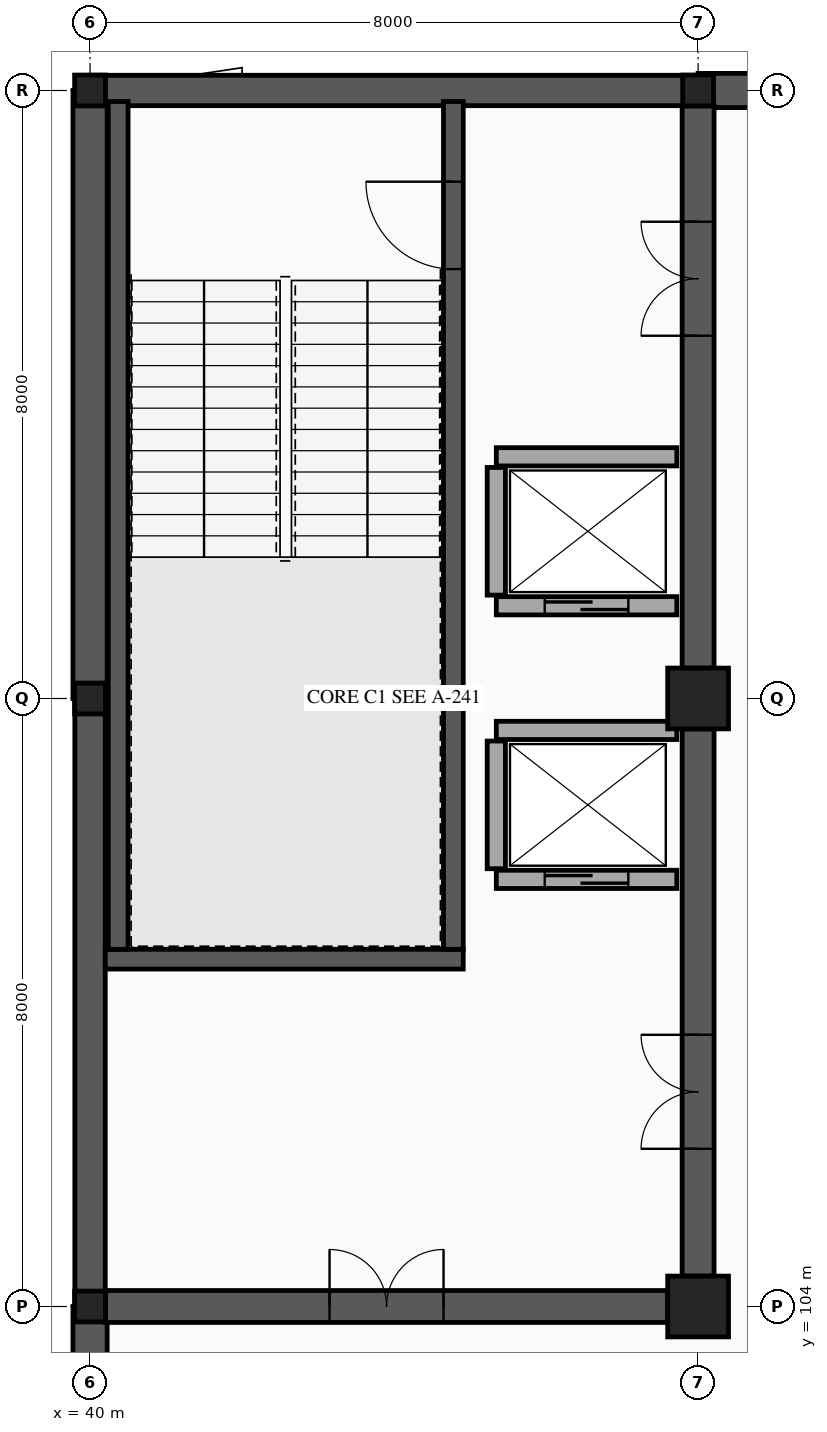
"""IFC4 building model, lengths in metres.
Left out: names, types, materials, properties, quantities, classifications, styles, units other than length and angle.
Written with IfcOpenShell. Run it as: python <this file> out.ifc"""

import sys

from ifc_helpers import new_model, si_unit, direction, frame, frame_2d, origin, origin_2d, place, context, subcontext, project, spatial, rectangle, hollow_rectangle, extrude, element, fill, save


model = new_model("IFC4")
c1 = context("Model", 3, precision=1e-05, world=origin(), true_north=direction((0.0, 1.0)))
c2 = subcontext(c1, "Body", "Model", "MODEL_VIEW")
j1 = project(units=[si_unit("LENGTHUNIT", "METRE"), si_unit("PLANEANGLEUNIT", "RADIAN")], contexts=[c1])
p1 = place(None, origin())
s1 = spatial("IfcSite", under=j1, at=p1, CompositionType="ELEMENT")
p2 = place(p1, origin())
s2 = spatial("IfcBuilding", under=s1, at=p2, CompositionType="ELEMENT")
p3 = place(p2, frame((0.0, 0.0, -4.8)))
s3 = spatial("IfcBuildingStorey", under=s2, at=p3, CompositionType="ELEMENT", Elevation=-4.8)
for number, where, z_axis, x_axis in (
    (1, (40.0, 104.0, 0.0), (0.0, 0.0, 1.0), (1.0, 0.0, 0.0)),
    (2, (40.0, 112.0, 0.0), (0.0, 0.0, 1.0), (1.0, 0.0, 0.0)),
    (3, (40.0, 120.0, 0.0), (0.0, 0.0, 1.0), (1.0, 0.0, 0.0)),
):
    element("IfcColumn", number, at=place(p3, frame(where, z_axis=z_axis, x_axis=x_axis)), inside=s3, PredefinedType="COLUMN", context=c2, shape_type="SweptSolid", body=[
        extrude(hollow_rectangle(XDim=0.406, YDim=0.406, WallThickness=0.015, InnerFilletRadius=0.015, OuterFilletRadius=0.029, at=origin_2d()), origin(), (0.0, 0.0, 1.0), 4.8),
    ])
for number, where, z_axis, x_axis in (
    (4, (48.0, 104.0, 0.0), (0.0, 0.0, 1.0), (1.0, 0.0, 0.0)),
    (5, (48.0, 112.0, 0.0), (0.0, 0.0, 1.0), (1.0, 0.0, 0.0)),
):
    element("IfcColumn", number, at=place(p3, frame(where, z_axis=z_axis, x_axis=x_axis)), inside=s3, PredefinedType="COLUMN", context=c2, shape_type="SweptSolid", body=[
        extrude(rectangle(XDim=0.8, YDim=0.8, at=origin_2d()), origin(), (0.0, 0.0, 1.0), 4.8),
    ])
p4 = place(p3, frame((48.0, 120.0, 0.0), z_axis=(0.0, 0.0, 1.0), x_axis=(1.0, 0.0, 0.0)))
e6 = element("IfcColumn", 6, at=p4, inside=s3, PredefinedType="COLUMN", context=c2, shape_type="SweptSolid", body=[
    extrude(hollow_rectangle(XDim=0.406, YDim=0.406, WallThickness=0.015, InnerFilletRadius=0.015, OuterFilletRadius=0.029, at=origin_2d()), origin(), (0.0, 0.0, 1.0), 4.8),
])
p5 = place(p3, frame((40.0, 96.0, 0.0), z_axis=(0.0, 0.0, 1.0), x_axis=(0.0, 1.0, 0.0)))
e7 = element("IfcWall", 7, at=p5, inside=s3, PredefinedType="USERDEFINED", context=c2, shape_type="SweptSolid", body=[
    extrude(rectangle(XDim=8.0, YDim=0.45, at=frame_2d((4.0, 0.0))), origin(), (0.0, 0.0, 1.0), 4.5),
])
p6 = place(p3, frame((40.0, 104.0, 0.0), z_axis=(0.0, 0.0, 1.0), x_axis=(0.0, 1.0, 0.0)))
e8 = element("IfcWall", 8, at=p6, inside=s3, PredefinedType="USERDEFINED", context=c2, shape_type="SweptSolid", body=[
    extrude(rectangle(XDim=8.0, YDim=0.4, at=frame_2d((4.0, 0.0))), origin(), (0.0, 0.0, 1.0), 4.5),
])
p7 = place(p3, frame((40.0, 112.0, 0.0), z_axis=(0.0, 0.0, 1.0), x_axis=(0.0, 1.0, 0.0)))
e9 = element("IfcWall", 9, at=p7, inside=s3, PredefinedType="USERDEFINED", context=c2, shape_type="SweptSolid", body=[
    extrude(rectangle(XDim=8.0, YDim=0.45, at=frame_2d((4.0, 0.0))), origin(), (0.0, 0.0, 1.0), 4.5),
])
p8 = place(p3, frame((40.0, 120.0, 0.0), z_axis=(0.0, 0.0, 1.0), x_axis=(1.0, 0.0, 0.0)))
e10 = element("IfcWall", 10, at=p8, inside=s3, PredefinedType="USERDEFINED", context=c2, shape_type="SweptSolid", body=[
    extrude(rectangle(XDim=8.0, YDim=0.4, at=frame_2d((4.0, 0.0))), origin(), (0.0, 0.0, 1.0), 4.5),
])
p9 = place(p3, frame((48.0, 120.0, 0.0), z_axis=(0.0, 0.0, 1.0), x_axis=(1.0, 0.0, 0.0)))
e11 = element("IfcWall", 11, at=p9, inside=s3, PredefinedType="USERDEFINED", context=c2, shape_type="SweptSolid", body=[
    extrude(rectangle(XDim=8.0, YDim=0.45, at=frame_2d((4.0, 0.0))), origin(), (0.0, 0.0, 1.0), 4.5),
])
p10 = place(p3, frame((40.2, 108.57, 0.0), z_axis=(0.0, 0.0, 1.0), x_axis=(1.0, 0.0, 0.0)))
e12 = element("IfcWall", 12, at=p10, inside=s3, PredefinedType="SHEAR", context=c2, shape_type="SweptSolid", body=[
    extrude(rectangle(XDim=4.71, YDim=0.26, at=frame_2d((2.355, 0.0))), origin(), (0.0, 0.0, 1.0), 4.58),
])
p11 = place(p3, frame((40.37, 108.7, 0.0), z_axis=(0.0, 0.0, 1.0), x_axis=(0.0, 1.0, 0.0)))
e13 = element("IfcWall", 13, at=p11, inside=s3, PredefinedType="SHEAR", context=c2, shape_type="SweptSolid", body=[
    extrude(rectangle(XDim=11.155, YDim=0.26, at=frame_2d((5.578, 0.0))), origin(), (0.0, 0.0, 1.0), 4.58),
])
p12 = place(p3, frame((44.78, 108.7, 0.0), z_axis=(0.0, 0.0, 1.0), x_axis=(0.0, 1.0, 0.0)))
e14 = element("IfcWall", 14, at=p12, inside=s3, PredefinedType="SHEAR", context=c2, shape_type="SweptSolid", body=[
    extrude(rectangle(XDim=11.155, YDim=0.26, at=frame_2d((5.578, 0.0))), origin(), (0.0, 0.0, 1.0), 4.58),
])
p13 = place(p12, frame((8.95, 0.0, 0.0)))
e15 = element("IfcOpeningElement", 15, at=p13, cuts=e14, PredefinedType="OPENING", context=c2, shape_type="SweptSolid", body=[
    extrude(rectangle(XDim=1.15, YDim=2.15, at=frame_2d((0.575, 1.075))), frame((0.0, 0.14, 0.0), z_axis=(0.0, -1.0, 0.0), x_axis=(1.0, 0.0, 0.0)), (0.0, 0.0, 1.0), 0.28),
])
p14 = place(p3, frame((40.203, 104.0, 0.0), z_axis=(0.0, 0.0, 1.0), x_axis=(1.0, 0.0, 0.0)))
e16 = element("IfcWall", 16, at=p14, inside=s3, PredefinedType="SHEAR", context=c2, shape_type="SweptSolid", body=[
    extrude(rectangle(XDim=7.397, YDim=0.42, at=frame_2d((3.699, 0.0))), origin(), (0.0, 0.0, 1.0), 4.58),
])
p15 = place(p14, frame((2.948, 0.0, 0.0)))
e17 = element("IfcOpeningElement", 17, at=p15, cuts=e16, PredefinedType="OPENING", context=c2, shape_type="SweptSolid", body=[
    extrude(rectangle(XDim=1.5, YDim=2.15, at=frame_2d((0.75, 1.075))), frame((0.0, 0.22, 0.0), z_axis=(0.0, -1.0, 0.0), x_axis=(1.0, 0.0, 0.0)), (0.0, 0.0, 1.0), 0.44),
])
p16 = place(p3, frame((48.0, 104.4, 0.0), z_axis=(0.0, 0.0, 1.0), x_axis=(0.0, 1.0, 0.0)))
e18 = element("IfcWall", 18, at=p16, inside=s3, PredefinedType="SHEAR", context=c2, shape_type="SweptSolid", body=[
    extrude(rectangle(XDim=7.2, YDim=0.42, at=frame_2d((3.6, 0.0))), origin(), (0.0, 0.0, 1.0), 4.58),
])
p17 = place(p16, frame((1.675, 0.0, 0.0)))
e19 = element("IfcOpeningElement", 19, at=p17, cuts=e18, PredefinedType="OPENING", context=c2, shape_type="SweptSolid", body=[
    extrude(rectangle(XDim=1.5, YDim=2.15, at=frame_2d((0.75, 1.075))), frame((0.0, 0.22, 0.0), z_axis=(0.0, -1.0, 0.0), x_axis=(1.0, 0.0, 0.0)), (0.0, 0.0, 1.0), 0.44),
])
p18 = place(p3, frame((48.0, 112.4, 0.0), z_axis=(0.0, 0.0, 1.0), x_axis=(0.0, 1.0, 0.0)))
e20 = element("IfcWall", 20, at=p18, inside=s3, PredefinedType="SHEAR", context=c2, shape_type="SweptSolid", body=[
    extrude(rectangle(XDim=7.397, YDim=0.42, at=frame_2d((3.699, 0.0))), origin(), (0.0, 0.0, 1.0), 4.58),
])
p19 = place(p18, frame((4.373, 0.0, 0.0)))
e21 = element("IfcOpeningElement", 21, at=p19, cuts=e20, PredefinedType="OPENING", context=c2, shape_type="SweptSolid", body=[
    extrude(rectangle(XDim=1.5, YDim=2.15, at=frame_2d((0.75, 1.075))), frame((0.0, 0.22, 0.0), z_axis=(0.0, -1.0, 0.0), x_axis=(1.0, 0.0, 0.0)), (0.0, 0.0, 1.0), 0.44),
])
p20 = place(p3, frame((45.345, 113.22, 0.0), z_axis=(0.0, 0.0, 1.0), x_axis=(1.0, 0.0, 0.0)))
e22 = element("IfcWall", 22, at=p20, inside=s3, PredefinedType="PARTITIONING", context=c2, shape_type="SweptSolid", body=[
    extrude(rectangle(XDim=2.375, YDim=0.24, at=frame_2d((1.188, 0.0))), origin(), (0.0, 0.0, 1.0), 4.58),
])
p21 = place(p20, frame((0.637, 0.0, 0.0)))
e23 = element("IfcOpeningElement", 23, at=p21, cuts=e22, PredefinedType="OPENING", context=c2, shape_type="SweptSolid", body=[
    extrude(rectangle(XDim=1.1, YDim=2.15, at=frame_2d((0.55, 1.075))), frame((0.0, 0.13, 0.0), z_axis=(0.0, -1.0, 0.0), x_axis=(1.0, 0.0, 0.0)), (0.0, 0.0, 1.0), 0.26),
])
p22 = place(p3, frame((45.345, 115.18, 0.0), z_axis=(0.0, 0.0, 1.0), x_axis=(1.0, 0.0, 0.0)))
e24 = element("IfcWall", 24, at=p22, inside=s3, PredefinedType="PARTITIONING", context=c2, shape_type="SweptSolid", body=[
    extrude(rectangle(XDim=2.375, YDim=0.24, at=frame_2d((1.188, 0.0))), origin(), (0.0, 0.0, 1.0), 4.58),
])
p23 = place(p3, frame((45.345, 113.36, 0.0), z_axis=(0.0, 0.0, 1.0), x_axis=(0.0, 1.0, 0.0)))
e25 = element("IfcWall", 25, at=p23, inside=s3, PredefinedType="PARTITIONING", context=c2, shape_type="SweptSolid", body=[
    extrude(rectangle(XDim=1.68, YDim=0.24, at=frame_2d((0.84, 0.0))), origin(), (0.0, 0.0, 1.0), 4.58),
])
p24 = place(p3, frame((45.345, 109.62, 0.0), z_axis=(0.0, 0.0, 1.0), x_axis=(1.0, 0.0, 0.0)))
e26 = element("IfcWall", 26, at=p24, inside=s3, PredefinedType="PARTITIONING", context=c2, shape_type="SweptSolid", body=[
    extrude(rectangle(XDim=2.375, YDim=0.24, at=frame_2d((1.188, 0.0))), origin(), (0.0, 0.0, 1.0), 4.58),
])
p25 = place(p24, frame((0.637, 0.0, 0.0)))
e27 = element("IfcOpeningElement", 27, at=p25, cuts=e26, PredefinedType="OPENING", context=c2, shape_type="SweptSolid", body=[
    extrude(rectangle(XDim=1.1, YDim=2.15, at=frame_2d((0.55, 1.075))), frame((0.0, 0.13, 0.0), z_axis=(0.0, -1.0, 0.0), x_axis=(1.0, 0.0, 0.0)), (0.0, 0.0, 1.0), 0.26),
])
p26 = place(p3, frame((45.345, 111.58, 0.0), z_axis=(0.0, 0.0, 1.0), x_axis=(1.0, 0.0, 0.0)))
e28 = element("IfcWall", 28, at=p26, inside=s3, PredefinedType="PARTITIONING", context=c2, shape_type="SweptSolid", body=[
    extrude(rectangle(XDim=2.375, YDim=0.24, at=frame_2d((1.188, 0.0))), origin(), (0.0, 0.0, 1.0), 4.58),
])
p27 = place(p3, frame((45.345, 109.76, 0.0), z_axis=(0.0, 0.0, 1.0), x_axis=(0.0, 1.0, 0.0)))
e29 = element("IfcWall", 29, at=p27, inside=s3, PredefinedType="PARTITIONING", context=c2, shape_type="SweptSolid", body=[
    extrude(rectangle(XDim=1.68, YDim=0.24, at=frame_2d((0.84, 0.0))), origin(), (0.0, 0.0, 1.0), 4.58),
])
p28 = place(p13, origin())
e30 = element("IfcDoor", 30, at=p28, inside=s3, OperationType="SINGLE_SWING_RIGHT", PredefinedType="DOOR", context=c2, shape_type="SweptSolid", body=[
    extrude(rectangle(XDim=1.15, YDim=2.15, at=frame_2d((0.575, 1.075))), frame((0.0, 0.025, 0.0), z_axis=(0.0, -1.0, 0.0), x_axis=(1.0, 0.0, 0.0)), (0.0, 0.0, 1.0), 0.05),
])
fill(e15, e30)
p29 = place(p15, origin())
e31 = element("IfcDoor", 31, at=p29, inside=s3, OperationType="DOUBLE_DOOR_SINGLE_SWING", PredefinedType="DOOR", context=c2, shape_type="SweptSolid", body=[
    extrude(rectangle(XDim=1.5, YDim=2.15, at=frame_2d((0.75, 1.075))), frame((0.0, 0.025, 0.0), z_axis=(0.0, -1.0, 0.0), x_axis=(1.0, 0.0, 0.0)), (0.0, 0.0, 1.0), 0.05),
])
fill(e17, e31)
p30 = place(p17, origin())
e32 = element("IfcDoor", 32, at=p30, inside=s3, OperationType="DOUBLE_DOOR_SINGLE_SWING", PredefinedType="DOOR", context=c2, shape_type="SweptSolid", body=[
    extrude(rectangle(XDim=1.5, YDim=2.15, at=frame_2d((0.75, 1.075))), frame((0.0, 0.025, 0.0), z_axis=(0.0, -1.0, 0.0), x_axis=(1.0, 0.0, 0.0)), (0.0, 0.0, 1.0), 0.05),
])
fill(e19, e32)
p31 = place(p19, origin())
e33 = element("IfcDoor", 33, at=p31, inside=s3, OperationType="DOUBLE_DOOR_SINGLE_SWING", PredefinedType="DOOR", context=c2, shape_type="SweptSolid", body=[
    extrude(rectangle(XDim=1.5, YDim=2.15, at=frame_2d((0.75, 1.075))), frame((0.0, 0.025, 0.0), z_axis=(0.0, -1.0, 0.0), x_axis=(1.0, 0.0, 0.0)), (0.0, 0.0, 1.0), 0.05),
])
fill(e21, e33)
p32 = place(p21, origin())
e34 = element("IfcDoor", 34, at=p32, inside=s3, OperationType="SLIDING_TO_LEFT", PredefinedType="DOOR", context=c2, shape_type="SweptSolid", body=[
    extrude(rectangle(XDim=1.1, YDim=2.15, at=frame_2d((0.55, 1.075))), frame((0.0, 0.025, 0.0), z_axis=(0.0, -1.0, 0.0), x_axis=(1.0, 0.0, 0.0)), (0.0, 0.0, 1.0), 0.05),
])
fill(e23, e34)
p33 = place(p25, origin())
e35 = element("IfcDoor", 35, at=p33, inside=s3, OperationType="SLIDING_TO_LEFT", PredefinedType="DOOR", context=c2, shape_type="SweptSolid", body=[
    extrude(rectangle(XDim=1.1, YDim=2.15, at=frame_2d((0.55, 1.075))), frame((0.0, 0.025, 0.0), z_axis=(0.0, -1.0, 0.0), x_axis=(1.0, 0.0, 0.0)), (0.0, 0.0, 1.0), 0.05),
])
fill(e27, e35)
save(model, sys.argv[1])
